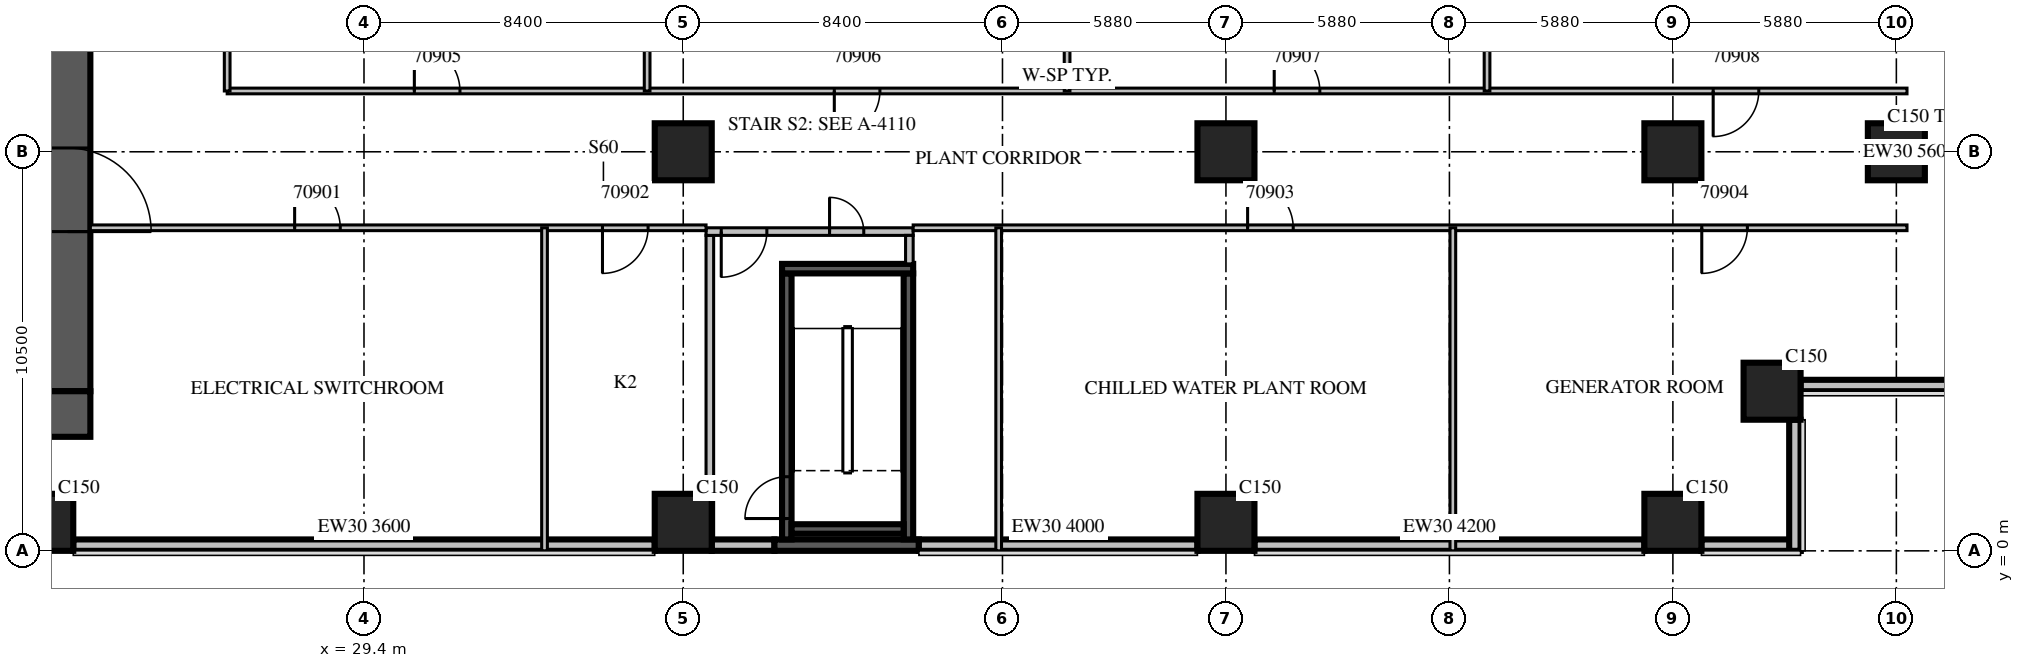
"""IFC4 building model, lengths in metres.
Left out: names, types, materials, properties, quantities, classifications, styles, units other than length and angle.
Written with IfcOpenShell. Run it as: python <this file> out.ifc"""

import sys

from ifc_helpers import new_model, si_unit, direction, frame, frame_2d, origin, origin_2d, place, context, subcontext, project, spatial, rectangle, extrude, source, transform, mapped, element, fill, save


model = new_model("IFC4")
c1 = context("Model", 3, precision=1e-05, world=origin(), true_north=direction((0.0, 1.0)))
c2 = subcontext(c1, "Body", "Model", "MODEL_VIEW")
j1 = project(units=[si_unit("LENGTHUNIT", "METRE"), si_unit("PLANEANGLEUNIT", "RADIAN")], contexts=[c1])
p1 = place(None, origin())
s1 = spatial("IfcSite", under=j1, at=p1, CompositionType="ELEMENT")
p2 = place(p1, origin())
s2 = spatial("IfcBuilding", under=s1, at=p2, CompositionType="ELEMENT")
p3 = place(p2, frame((0.0, 0.0, 34.5)))
s3 = spatial("IfcBuildingStorey", under=s2, at=p3, CompositionType="ELEMENT", Elevation=34.5)
m1 = source(origin(), c2, "Body", "SweptSolid", [
    extrude(rectangle(XDim=1.5, YDim=1.5, at=origin_2d()), origin(), (0.0, 0.0, 1.0), 6.0),
])
for number, where, z_axis, x_axis in (
    (1, (21.0, 0.75, 0.0), (0.0, 0.0, 1.0), (1.0, 0.0, 0.0)),
    (2, (37.8, 0.75, 0.0), (0.0, 0.0, 1.0), (1.0, 0.0, 0.0)),
    (3, (37.8, 10.5, 0.0), (0.0, 0.0, 1.0), (1.0, 0.0, 0.0)),
    (4, (52.08, 0.75, 0.0), (0.0, 0.0, 1.0), (1.0, 0.0, 0.0)),
    (5, (52.08, 10.5, 0.0), (0.0, 0.0, 1.0), (1.0, 0.0, 0.0)),
    (6, (63.84, 0.75, 0.0), (0.0, 0.0, 1.0), (1.0, 0.0, 0.0)),
    (7, (63.84, 10.5, 0.0), (0.0, 0.0, 1.0), (1.0, 0.0, 0.0)),
    (8, (66.45, 4.2, 0.0), (0.0, 0.0, 1.0), (1.0, 0.0, 0.0)),
    (9, (69.72, 10.5, 0.0), (0.0, 0.0, 1.0), (1.0, 0.0, 0.0)),
):
    element("IfcColumn", number, at=place(p3, frame(where, z_axis=z_axis, x_axis=x_axis)), inside=s3, PredefinedType="COLUMN", context=c2, shape_type="MappedRepresentation", body=[
        mapped(m1, transform((0.0, 0.0, 0.0), scale=1.0)),
    ])
p4 = place(p3, frame((21.6, 4.2, 0.0), z_axis=(0.0, 0.0, 1.0), x_axis=(0.0, 1.0, 0.0)))
e10 = element("IfcWall", 10, at=p4, inside=s3, PredefinedType="SHEAR", context=c2, shape_type="SweptSolid", body=[
    extrude(rectangle(XDim=16.8, YDim=1.2, at=frame_2d((8.4, 0.0))), origin(), (0.0, 0.0, 1.0), 6.0),
])
m2 = source(origin(), c2, "Body", "SweptSolid", [
    extrude(rectangle(XDim=2.2, YDim=2.1, at=frame_2d((1.1, 1.05))), frame((0.0, 0.61, 0.0), z_axis=(0.0, -1.0, 0.0), x_axis=(1.0, 0.0, 0.0)), (0.0, 0.0, 1.0), 1.22),
])
p5 = place(p4, frame((4.2, 0.0, 0.0)))
e11 = element("IfcOpeningElement", 11, at=p5, cuts=e10, PredefinedType="OPENING", context=c2, shape_type="MappedRepresentation", body=[
    mapped(m2, transform((0.0, 0.0, 0.0), scale=1.0)),
])
m3 = source(origin(), c2, "Body", "SweptSolid", [
    extrude(rectangle(XDim=1.2, YDim=2.1, at=frame_2d((0.6, 1.05))), frame((0.0, 0.61, 0.0), z_axis=(0.0, -1.0, 0.0), x_axis=(1.0, 0.0, 0.0)), (0.0, 0.0, 1.0), 1.22),
])
p6 = place(p4, frame((14.7, 0.0, 0.0)))
e12 = element("IfcOpeningElement", 12, at=p6, cuts=e10, PredefinedType="OPENING", context=c2, shape_type="MappedRepresentation", body=[
    mapped(m3, transform((0.0, 0.0, 0.0), scale=1.0)),
])
m4 = source(origin(), c2, "Body", "SweptSolid", [
    extrude(rectangle(XDim=18.0, YDim=1.2, at=frame_2d((9.0, 0.0))), origin(), (0.0, 0.0, 1.0), 6.0),
])
p7 = place(p3, frame((4.2, 3.6, 0.0), z_axis=(0.0, 0.0, 1.0), x_axis=(1.0, 0.0, 0.0)))
e13 = element("IfcWall", 13, at=p7, inside=s3, PredefinedType="SHEAR", context=c2, shape_type="MappedRepresentation", body=[
    mapped(m4, transform((0.0, 0.0, 0.0), scale=1.0)),
])
p8 = place(p3, frame((21.75, 0.15, 0.0), z_axis=(0.0, 0.0, 1.0), x_axis=(1.0, 0.0, 0.0)))
e14 = element("IfcWall", 14, at=p8, inside=s3, PredefinedType="STANDARD", context=c2, shape_type="SweptSolid", body=[
    extrude(rectangle(XDim=15.3, YDim=0.3, at=frame_2d((7.65, 0.0))), origin(), (0.0, 0.0, 1.0), 3.6),
])
p9 = place(p3, frame((38.55, 0.15, 0.0), z_axis=(0.0, 0.0, 1.0), x_axis=(1.0, 0.0, 0.0)))
e15 = element("IfcWall", 15, at=p9, inside=s3, PredefinedType="STANDARD", context=c2, shape_type="SweptSolid", body=[
    extrude(rectangle(XDim=1.65, YDim=0.3, at=frame_2d((0.825, 0.0))), origin(), (0.0, 0.0, 1.0), 4.0),
])
p10 = place(p3, frame((40.2, 0.15, 0.0), z_axis=(0.0, 0.0, 1.0), x_axis=(1.0, 0.0, 0.0)))
e16 = element("IfcWall", 16, at=p10, inside=s3, PredefinedType="SOLIDWALL", context=c2, shape_type="SweptSolid", body=[
    extrude(rectangle(XDim=3.8, YDim=0.3, at=frame_2d((1.9, 0.0))), origin(), (0.0, 0.0, 1.0), 5.6),
])
p11 = place(p3, frame((44.0, 0.15, 0.0), z_axis=(0.0, 0.0, 1.0), x_axis=(1.0, 0.0, 0.0)))
e17 = element("IfcWall", 17, at=p11, inside=s3, PredefinedType="STANDARD", context=c2, shape_type="SweptSolid", body=[
    extrude(rectangle(XDim=7.33, YDim=0.3, at=frame_2d((3.665, 0.0))), origin(), (0.0, 0.0, 1.0), 4.0),
])
p12 = place(p3, frame((52.83, 0.15, 0.0), z_axis=(0.0, 0.0, 1.0), x_axis=(1.0, 0.0, 0.0)))
e18 = element("IfcWall", 18, at=p12, inside=s3, PredefinedType="STANDARD", context=c2, shape_type="SweptSolid", body=[
    extrude(rectangle(XDim=10.26, YDim=0.3, at=frame_2d((5.13, 0.0))), origin(), (0.0, 0.0, 1.0), 4.2),
])
p13 = place(p3, frame((64.59, 0.15, 0.0), z_axis=(0.0, 0.0, 1.0), x_axis=(1.0, 0.0, 0.0)))
e19 = element("IfcWall", 19, at=p13, inside=s3, PredefinedType="STANDARD", context=c2, shape_type="SweptSolid", body=[
    extrude(rectangle(XDim=2.61, YDim=0.3, at=frame_2d((1.305, 0.0))), origin(), (0.0, 0.0, 1.0), 5.6),
])
p14 = place(p3, frame((67.05, 0.0, 0.0), z_axis=(0.0, 0.0, 1.0), x_axis=(0.0, 1.0, 0.0)))
e20 = element("IfcWall", 20, at=p14, inside=s3, PredefinedType="STANDARD", context=c2, shape_type="SweptSolid", body=[
    extrude(rectangle(XDim=3.45, YDim=0.3, at=frame_2d((1.725, 0.0))), origin(), (0.0, 0.0, 1.0), 5.6),
])
p15 = place(p3, frame((67.2, 4.35, 0.0), z_axis=(0.0, 0.0, 1.0), x_axis=(1.0, 0.0, 0.0)))
e21 = element("IfcWall", 21, at=p15, inside=s3, PredefinedType="STANDARD", context=c2, shape_type="SweptSolid", body=[
    extrude(rectangle(XDim=4.2, YDim=0.3, at=frame_2d((2.1, 0.0))), origin(), (0.0, 0.0, 1.0), 5.6),
])
p16 = place(p3, frame((40.525, 0.3, 0.0), z_axis=(0.0, 0.0, 1.0), x_axis=(0.0, 1.0, 0.0)))
e22 = element("IfcWall", 22, at=p16, inside=s3, PredefinedType="SOLIDWALL", context=c2, shape_type="SweptSolid", body=[
    extrude(rectangle(XDim=7.0, YDim=0.25, at=frame_2d((3.5, 0.0))), origin(), (0.0, 0.0, 1.0), 5.6),
])
m5 = source(origin(), c2, "Body", "SweptSolid", [
    extrude(rectangle(XDim=1.1, YDim=2.1, at=frame_2d((0.55, 1.05))), frame((0.0, 0.135, 0.0), z_axis=(0.0, -1.0, 0.0), x_axis=(1.0, 0.0, 0.0)), (0.0, 0.0, 1.0), 0.27),
])
p17 = place(p16, frame((0.55, 0.0, 0.0)))
e23 = element("IfcOpeningElement", 23, at=p17, cuts=e22, PredefinedType="OPENING", context=c2, shape_type="MappedRepresentation", body=[
    mapped(m5, transform((0.0, 0.0, 0.0), scale=1.0)),
])
m6 = source(origin(), c2, "Body", "SweptSolid", [
    extrude(rectangle(XDim=7.0, YDim=0.25, at=frame_2d((3.5, 0.0))), origin(), (0.0, 0.0, 1.0), 5.6),
])
p18 = place(p3, frame((43.725, 0.3, 0.0), z_axis=(0.0, 0.0, 1.0), x_axis=(0.0, 1.0, 0.0)))
e24 = element("IfcWall", 24, at=p18, inside=s3, PredefinedType="SOLIDWALL", context=c2, shape_type="MappedRepresentation", body=[
    mapped(m6, transform((0.0, 0.0, 0.0), scale=1.0)),
])
p19 = place(p3, frame((40.4, 7.425, 0.0), z_axis=(0.0, 0.0, 1.0), x_axis=(1.0, 0.0, 0.0)))
e25 = element("IfcWall", 25, at=p19, inside=s3, PredefinedType="SOLIDWALL", context=c2, shape_type="SweptSolid", body=[
    extrude(rectangle(XDim=3.45, YDim=0.25, at=frame_2d((1.725, 0.0))), origin(), (0.0, 0.0, 1.0), 5.6),
])
p20 = place(p3, frame((40.65, 0.575, 0.0), z_axis=(0.0, 0.0, 1.0), x_axis=(1.0, 0.0, 0.0)))
e26 = element("IfcWall", 26, at=p20, inside=s3, PredefinedType="SOLIDWALL", context=c2, shape_type="SweptSolid", body=[
    extrude(rectangle(XDim=2.95, YDim=0.25, at=frame_2d((1.475, 0.0))), origin(), (0.0, 0.0, 1.0), 5.6),
])
p21 = place(p3, frame((38.5, 0.3, 0.0), z_axis=(0.0, 0.0, 1.0), x_axis=(0.0, 1.0, 0.0)))
e27 = element("IfcWall", 27, at=p21, inside=s3, PredefinedType="PARTITIONING", context=c2, shape_type="SweptSolid", body=[
    extrude(rectangle(XDim=8.0, YDim=0.2, at=frame_2d((4.0, 0.0))), origin(), (0.0, 0.0, 1.0), 5.6),
])
p22 = place(p3, frame((38.4, 8.4, 0.0), z_axis=(0.0, 0.0, 1.0), x_axis=(1.0, 0.0, 0.0)))
e28 = element("IfcWall", 28, at=p22, inside=s3, PredefinedType="PARTITIONING", context=c2, shape_type="SweptSolid", body=[
    extrude(rectangle(XDim=5.45, YDim=0.2, at=frame_2d((2.725, 0.0))), origin(), (0.0, 0.0, 1.0), 5.6),
])
m7 = source(origin(), c2, "Body", "SweptSolid", [
    extrude(rectangle(XDim=1.2, YDim=2.1, at=frame_2d((0.6, 1.05))), frame((0.0, 0.11, 0.0), z_axis=(0.0, -1.0, 0.0), x_axis=(1.0, 0.0, 0.0)), (0.0, 0.0, 1.0), 0.22),
])
p23 = place(p22, frame((0.4, 0.0, 0.0)))
e29 = element("IfcOpeningElement", 29, at=p23, cuts=e28, PredefinedType="OPENING", context=c2, shape_type="MappedRepresentation", body=[
    mapped(m7, transform((0.0, 0.0, 0.0), scale=1.0)),
])
m8 = source(origin(), c2, "Body", "SweptSolid", [
    extrude(rectangle(XDim=0.9, YDim=2.1, at=frame_2d((0.45, 1.05))), frame((0.0, 0.11, 0.0), z_axis=(0.0, -1.0, 0.0), x_axis=(1.0, 0.0, 0.0)), (0.0, 0.0, 1.0), 0.22),
])
p24 = place(p22, frame((3.25, 0.0, 0.0)))
e30 = element("IfcOpeningElement", 30, at=p24, cuts=e28, PredefinedType="OPENING", context=c2, shape_type="MappedRepresentation", body=[
    mapped(m8, transform((0.0, 0.0, 0.0), scale=1.0)),
])
p25 = place(p3, frame((43.75, 7.55, 0.0), z_axis=(0.0, 0.0, 1.0), x_axis=(0.0, 1.0, 0.0)))
e31 = element("IfcWall", 31, at=p25, inside=s3, PredefinedType="PARTITIONING", context=c2, shape_type="SweptSolid", body=[
    extrude(rectangle(XDim=0.75, YDim=0.2, at=frame_2d((0.375, 0.0))), origin(), (0.0, 0.0, 1.0), 5.6),
])
p26 = place(p3, frame((22.2, 8.5, 0.0), z_axis=(0.0, 0.0, 1.0), x_axis=(1.0, 0.0, 0.0)))
e32 = element("IfcWall", 32, at=p26, inside=s3, PredefinedType="PARTITIONING", context=c2, shape_type="SweptSolid", body=[
    extrude(rectangle(XDim=16.2, YDim=0.15, at=frame_2d((8.1, 0.0))), origin(), (0.0, 0.0, 1.0), 5.6),
])
m9 = source(origin(), c2, "Body", "SweptSolid", [
    extrude(rectangle(XDim=1.2, YDim=2.1, at=frame_2d((0.6, 1.05))), frame((0.0, 0.085, 0.0), z_axis=(0.0, -1.0, 0.0), x_axis=(1.0, 0.0, 0.0)), (0.0, 0.0, 1.0), 0.17),
])
p27 = place(p26, frame((5.375, 0.0, 0.0)))
e33 = element("IfcOpeningElement", 33, at=p27, cuts=e32, PredefinedType="OPENING", context=c2, shape_type="MappedRepresentation", body=[
    mapped(m9, transform((0.0, 0.0, 0.0), scale=1.0)),
])
p28 = place(p26, frame((13.475, 0.0, 0.0)))
e34 = element("IfcOpeningElement", 34, at=p28, cuts=e32, PredefinedType="OPENING", context=c2, shape_type="MappedRepresentation", body=[
    mapped(m9, transform((0.0, 0.0, 0.0), scale=1.0)),
])
p29 = place(p3, frame((43.85, 8.5, 0.0), z_axis=(0.0, 0.0, 1.0), x_axis=(1.0, 0.0, 0.0)))
e35 = element("IfcWall", 35, at=p29, inside=s3, PredefinedType="PARTITIONING", context=c2, shape_type="SweptSolid", body=[
    extrude(rectangle(XDim=26.15, YDim=0.15, at=frame_2d((13.075, 0.0))), origin(), (0.0, 0.0, 1.0), 5.6),
])
p30 = place(p29, frame((8.8, 0.0, 0.0)))
e36 = element("IfcOpeningElement", 36, at=p30, cuts=e35, PredefinedType="OPENING", context=c2, shape_type="MappedRepresentation", body=[
    mapped(m9, transform((0.0, 0.0, 0.0), scale=1.0)),
])
p31 = place(p29, frame((20.75, 0.0, 0.0)))
e37 = element("IfcOpeningElement", 37, at=p31, cuts=e35, PredefinedType="OPENING", context=c2, shape_type="MappedRepresentation", body=[
    mapped(m9, transform((0.0, 0.0, 0.0), scale=1.0)),
])
p32 = place(p3, frame((25.8, 12.1, 0.0), z_axis=(0.0, 0.0, 1.0), x_axis=(1.0, 0.0, 0.0)))
e38 = element("IfcWall", 38, at=p32, inside=s3, PredefinedType="PARTITIONING", context=c2, shape_type="SweptSolid", body=[
    extrude(rectangle(XDim=44.2, YDim=0.15, at=frame_2d((22.1, 0.0))), origin(), (0.0, 0.0, 1.0), 5.6),
])
p33 = place(p32, frame((4.925, 0.0, 0.0)))
e39 = element("IfcOpeningElement", 39, at=p33, cuts=e38, PredefinedType="OPENING", context=c2, shape_type="MappedRepresentation", body=[
    mapped(m9, transform((0.0, 0.0, 0.0), scale=1.0)),
])
p34 = place(p32, frame((15.975, 0.0, 0.0)))
e40 = element("IfcOpeningElement", 40, at=p34, cuts=e38, PredefinedType="OPENING", context=c2, shape_type="MappedRepresentation", body=[
    mapped(m9, transform((0.0, 0.0, 0.0), scale=1.0)),
])
p35 = place(p32, frame((27.55, 0.0, 0.0)))
e41 = element("IfcOpeningElement", 41, at=p35, cuts=e38, PredefinedType="OPENING", context=c2, shape_type="MappedRepresentation", body=[
    mapped(m9, transform((0.0, 0.0, 0.0), scale=1.0)),
])
p36 = place(p32, frame((39.1, 0.0, 0.0)))
e42 = element("IfcOpeningElement", 42, at=p36, cuts=e38, PredefinedType="OPENING", context=c2, shape_type="MappedRepresentation", body=[
    mapped(m9, transform((0.0, 0.0, 0.0), scale=1.0)),
])
m10 = source(origin(), c2, "Body", "SweptSolid", [
    extrude(rectangle(XDim=8.9, YDim=0.15, at=frame_2d((4.45, 0.0))), origin(), (0.0, 0.0, 1.0), 5.6),
])
p37 = place(p3, frame((25.8, 12.1, 0.0), z_axis=(0.0, 0.0, 1.0), x_axis=(0.0, 1.0, 0.0)))
e43 = element("IfcWall", 43, at=p37, inside=s3, PredefinedType="PARTITIONING", context=c2, shape_type="MappedRepresentation", body=[
    mapped(m10, transform((0.0, 0.0, 0.0), scale=1.0)),
])
m11 = source(origin(), c2, "Body", "SweptSolid", [
    extrude(rectangle(XDim=8.5, YDim=0.15, at=frame_2d((4.25, 0.0))), origin(), (0.0, 0.0, 1.0), 5.6),
])
p38 = place(p3, frame((34.15, 0.0, 0.0), z_axis=(0.0, 0.0, 1.0), x_axis=(0.0, 1.0, 0.0)))
e44 = element("IfcWall", 44, at=p38, inside=s3, PredefinedType="PARTITIONING", context=c2, shape_type="MappedRepresentation", body=[
    mapped(m11, transform((0.0, 0.0, 0.0), scale=1.0)),
])
p39 = place(p3, frame((36.85, 12.1, 0.0), z_axis=(0.0, 0.0, 1.0), x_axis=(0.0, 1.0, 0.0)))
e45 = element("IfcWall", 45, at=p39, inside=s3, PredefinedType="PARTITIONING", context=c2, shape_type="MappedRepresentation", body=[
    mapped(m10, transform((0.0, 0.0, 0.0), scale=1.0)),
])
p40 = place(p3, frame((46.1, 0.0, 0.0), z_axis=(0.0, 0.0, 1.0), x_axis=(0.0, 1.0, 0.0)))
e46 = element("IfcWall", 46, at=p40, inside=s3, PredefinedType="PARTITIONING", context=c2, shape_type="MappedRepresentation", body=[
    mapped(m11, transform((0.0, 0.0, 0.0), scale=1.0)),
])
p41 = place(p3, frame((47.9, 12.1, 0.0), z_axis=(0.0, 0.0, 1.0), x_axis=(0.0, 1.0, 0.0)))
e47 = element("IfcWall", 47, at=p41, inside=s3, PredefinedType="PARTITIONING", context=c2, shape_type="MappedRepresentation", body=[
    mapped(m10, transform((0.0, 0.0, 0.0), scale=1.0)),
])
p42 = place(p3, frame((58.05, 0.0, 0.0), z_axis=(0.0, 0.0, 1.0), x_axis=(0.0, 1.0, 0.0)))
e48 = element("IfcWall", 48, at=p42, inside=s3, PredefinedType="PARTITIONING", context=c2, shape_type="MappedRepresentation", body=[
    mapped(m11, transform((0.0, 0.0, 0.0), scale=1.0)),
])
p43 = place(p3, frame((58.95, 12.1, 0.0), z_axis=(0.0, 0.0, 1.0), x_axis=(0.0, 1.0, 0.0)))
e49 = element("IfcWall", 49, at=p43, inside=s3, PredefinedType="PARTITIONING", context=c2, shape_type="MappedRepresentation", body=[
    mapped(m10, transform((0.0, 0.0, 0.0), scale=1.0)),
])
m12 = source(origin(), c2, "Body", "SweptSolid", [
    extrude(rectangle(XDim=1.1, YDim=2.1, at=frame_2d((0.55, 1.05))), frame((0.0, 0.025, 0.0), z_axis=(0.0, -1.0, 0.0), x_axis=(1.0, 0.0, 0.0)), (0.0, 0.0, 1.0), 0.05),
])
p44 = place(p17, origin())
e50 = element("IfcDoor", 50, at=p44, inside=s3, OperationType="SINGLE_SWING_LEFT", PredefinedType="DOOR", context=c2, shape_type="MappedRepresentation", body=[
    mapped(m12, transform((0.0, 0.0, 0.0), scale=1.0)),
])
fill(e23, e50)
m13 = source(origin(), c2, "Body", "SweptSolid", [
    extrude(rectangle(XDim=1.2, YDim=2.1, at=frame_2d((0.6, 1.05))), frame((0.0, 0.025, 0.0), z_axis=(0.0, -1.0, 0.0), x_axis=(1.0, 0.0, 0.0)), (0.0, 0.0, 1.0), 0.05),
])
p45 = place(p23, origin())
e51 = element("IfcDoor", 51, at=p45, inside=s3, OperationType="SINGLE_SWING_RIGHT", PredefinedType="DOOR", context=c2, shape_type="MappedRepresentation", body=[
    mapped(m13, transform((0.0, 0.0, 0.0), scale=1.0)),
])
fill(e29, e51)
m14 = source(origin(), c2, "Body", "SweptSolid", [
    extrude(rectangle(XDim=0.9, YDim=2.1, at=frame_2d((0.45, 1.05))), frame((0.0, 0.025, 0.0), z_axis=(0.0, -1.0, 0.0), x_axis=(1.0, 0.0, 0.0)), (0.0, 0.0, 1.0), 0.05),
])
p46 = place(p24, origin())
e52 = element("IfcDoor", 52, at=p46, inside=s3, OperationType="SINGLE_SWING_LEFT", PredefinedType="DOOR", context=c2, shape_type="MappedRepresentation", body=[
    mapped(m14, transform((0.0, 0.0, 0.0), scale=1.0)),
])
fill(e30, e52)
m15 = source(origin(), c2, "Body", "SweptSolid", [
    extrude(rectangle(XDim=2.2, YDim=2.1, at=frame_2d((1.1, 1.05))), frame((0.0, 0.025, 0.0), z_axis=(0.0, -1.0, 0.0), x_axis=(1.0, 0.0, 0.0)), (0.0, 0.0, 1.0), 0.05),
])
p47 = place(p5, origin())
e53 = element("IfcDoor", 53, at=p47, inside=s3, OperationType="DOUBLE_DOOR_SINGLE_SWING", PredefinedType="DOOR", context=c2, shape_type="MappedRepresentation", body=[
    mapped(m15, transform((0.0, 0.0, 0.0), scale=1.0)),
])
fill(e11, e53)
p48 = place(p27, origin())
e54 = element("IfcDoor", 54, at=p48, inside=s3, OperationType="SINGLE_SWING_LEFT", PredefinedType="DOOR", context=c2, shape_type="MappedRepresentation", body=[
    mapped(m13, transform((0.0, 0.0, 0.0), scale=1.0)),
])
fill(e33, e54)
p49 = place(p28, origin())
e55 = element("IfcDoor", 55, at=p49, inside=s3, OperationType="SINGLE_SWING_RIGHT", PredefinedType="DOOR", context=c2, shape_type="MappedRepresentation", body=[
    mapped(m13, transform((0.0, 0.0, 0.0), scale=1.0)),
])
fill(e34, e55)
p50 = place(p30, origin())
e56 = element("IfcDoor", 56, at=p50, inside=s3, OperationType="SINGLE_SWING_LEFT", PredefinedType="DOOR", context=c2, shape_type="MappedRepresentation", body=[
    mapped(m13, transform((0.0, 0.0, 0.0), scale=1.0)),
])
fill(e36, e56)
p51 = place(p31, origin())
e57 = element("IfcDoor", 57, at=p51, inside=s3, OperationType="SINGLE_SWING_RIGHT", PredefinedType="DOOR", context=c2, shape_type="MappedRepresentation", body=[
    mapped(m13, transform((0.0, 0.0, 0.0), scale=1.0)),
])
fill(e37, e57)
p52 = place(p33, origin())
e58 = element("IfcDoor", 58, at=p52, inside=s3, OperationType="SINGLE_SWING_LEFT", PredefinedType="DOOR", context=c2, shape_type="MappedRepresentation", body=[
    mapped(m13, transform((0.0, 0.0, 0.0), scale=1.0)),
])
fill(e39, e58)
p53 = place(p34, origin())
e59 = element("IfcDoor", 59, at=p53, inside=s3, OperationType="SINGLE_SWING_RIGHT", PredefinedType="DOOR", context=c2, shape_type="MappedRepresentation", body=[
    mapped(m13, transform((0.0, 0.0, 0.0), scale=1.0)),
])
fill(e40, e59)
p54 = place(p35, origin())
e60 = element("IfcDoor", 60, at=p54, inside=s3, OperationType="SINGLE_SWING_LEFT", PredefinedType="DOOR", context=c2, shape_type="MappedRepresentation", body=[
    mapped(m13, transform((0.0, 0.0, 0.0), scale=1.0)),
])
fill(e41, e60)
p55 = place(p36, origin())
e61 = element("IfcDoor", 61, at=p55, inside=s3, OperationType="SINGLE_SWING_RIGHT", PredefinedType="DOOR", context=c2, shape_type="MappedRepresentation", body=[
    mapped(m13, transform((0.0, 0.0, 0.0), scale=1.0)),
])
fill(e42, e61)
save(model, sys.argv[1])
